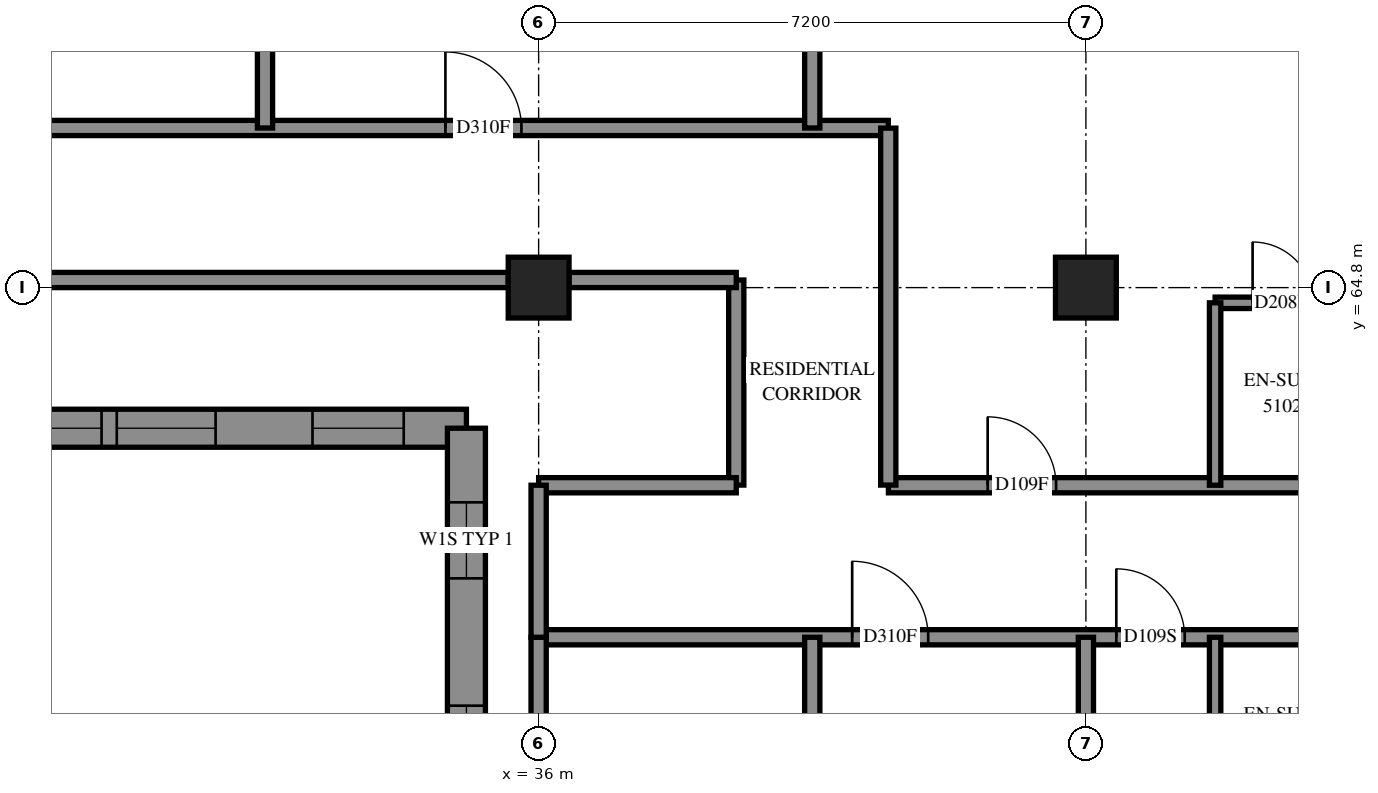
"""IFC4 building model, lengths in metres.
Left out: names, types, materials, properties, quantities, classifications, styles, units other than length and angle.
Written with IfcOpenShell. Run it as: python <this file> out.ifc"""

import sys

from ifc_helpers import new_model, si_unit, direction, frame, frame_2d, origin, origin_2d, place, context, subcontext, project, spatial, polyline, rectangle, outline, extrude, element, fill, save


model = new_model("IFC4")
c1 = context("Model", 3, precision=1e-05, world=origin(), true_north=direction((0.0, 1.0)))
c2 = subcontext(c1, "Body", "Model", "MODEL_VIEW")
j1 = project(units=[si_unit("LENGTHUNIT", "METRE"), si_unit("PLANEANGLEUNIT", "RADIAN")], contexts=[c1])
p1 = place(None, origin())
s1 = spatial("IfcSite", under=j1, at=p1, CompositionType="ELEMENT")
p2 = place(p1, origin())
s2 = spatial("IfcBuilding", under=s1, at=p2, CompositionType="ELEMENT")
p3 = place(p2, frame((0.0, 0.0, 189.6)))
s3 = spatial("IfcBuildingStorey", under=s2, at=p3, CompositionType="ELEMENT", Elevation=189.6)
for number, where, z_axis, x_axis in (
    (1, (36.0, 64.8, 0.0), (0.0, 0.0, 1.0), (1.0, 0.0, 0.0)),
    (2, (43.2, 64.8, 0.0), (0.0, 0.0, 1.0), (1.0, 0.0, 0.0)),
):
    element("IfcColumn", number, at=place(p3, frame(where, z_axis=z_axis, x_axis=x_axis)), inside=s3, PredefinedType="COLUMN", context=c2, shape_type="SweptSolid", body=[
        extrude(rectangle(XDim=0.8, YDim=0.8, at=origin_2d()), origin(), (0.0, 0.0, 1.0), 3.1),
    ])
p4 = place(p3, frame((19.75, 62.95, 0.0), z_axis=(0.0, 0.0, 1.0), x_axis=(1.0, 0.0, 0.0)))
e3 = element("IfcWall", 3, at=p4, inside=s3, PredefinedType="SOLIDWALL", context=c2, shape_type="SweptSolid", body=[
    extrude(outline(polyline([(-0.25, -0.25), (15.05, -0.25), (15.55, 0.25), (0.25, 0.25), (-0.25, -0.25)])), origin(), (0.0, 0.0, 1.0), 3.1),
])
p5 = place(p4, frame((2.25, 0.0, 0.45)))
e4 = element("IfcOpeningElement", 4, at=p5, cuts=e3, PredefinedType="OPENING", context=c2, shape_type="SweptSolid", body=[
    extrude(rectangle(XDim=1.3, YDim=2.5, at=frame_2d((0.65, 1.25))), frame((0.0, 0.26, 0.0), z_axis=(0.0, -1.0, 0.0), x_axis=(1.0, 0.0, 0.0)), (0.0, 0.0, 1.0), 0.52),
])
p6 = place(p4, frame((3.75, 0.0, 0.45)))
e5 = element("IfcOpeningElement", 5, at=p6, cuts=e3, PredefinedType="OPENING", context=c2, shape_type="SweptSolid", body=[
    extrude(rectangle(XDim=1.3, YDim=2.5, at=frame_2d((0.65, 1.25))), frame((0.0, 0.26, 0.0), z_axis=(0.0, -1.0, 0.0), x_axis=(1.0, 0.0, 0.0)), (0.0, 0.0, 1.0), 0.52),
])
p7 = place(p4, frame((5.85, 0.0, 0.45)))
e6 = element("IfcOpeningElement", 6, at=p7, cuts=e3, PredefinedType="OPENING", context=c2, shape_type="SweptSolid", body=[
    extrude(rectangle(XDim=1.3, YDim=2.5, at=frame_2d((0.65, 1.25))), frame((0.0, 0.26, 0.0), z_axis=(0.0, -1.0, 0.0), x_axis=(1.0, 0.0, 0.0)), (0.0, 0.0, 1.0), 0.52),
])
p8 = place(p4, frame((7.35, 0.0, 0.45)))
e7 = element("IfcOpeningElement", 7, at=p8, cuts=e3, PredefinedType="OPENING", context=c2, shape_type="SweptSolid", body=[
    extrude(rectangle(XDim=1.3, YDim=2.5, at=frame_2d((0.65, 1.25))), frame((0.0, 0.26, 0.0), z_axis=(0.0, -1.0, 0.0), x_axis=(1.0, 0.0, 0.0)), (0.0, 0.0, 1.0), 0.52),
])
p9 = place(p4, frame((9.2, 0.0, 0.45)))
e8 = element("IfcOpeningElement", 8, at=p9, cuts=e3, PredefinedType="OPENING", context=c2, shape_type="SweptSolid", body=[
    extrude(rectangle(XDim=1.3, YDim=2.5, at=frame_2d((0.65, 1.25))), frame((0.0, 0.26, 0.0), z_axis=(0.0, -1.0, 0.0), x_axis=(1.0, 0.0, 0.0)), (0.0, 0.0, 1.0), 0.52),
])
p10 = place(p4, frame((10.7, 0.0, 0.45)))
e9 = element("IfcOpeningElement", 9, at=p10, cuts=e3, PredefinedType="OPENING", context=c2, shape_type="SweptSolid", body=[
    extrude(rectangle(XDim=1.3, YDim=2.5, at=frame_2d((0.65, 1.25))), frame((0.0, 0.26, 0.0), z_axis=(0.0, -1.0, 0.0), x_axis=(1.0, 0.0, 0.0)), (0.0, 0.0, 1.0), 0.52),
])
p11 = place(p4, frame((0.55, 0.0, 0.45)))
e10 = element("IfcOpeningElement", 10, at=p11, cuts=e3, PredefinedType="OPENING", context=c2, shape_type="SweptSolid", body=[
    extrude(rectangle(XDim=1.2, YDim=2.5, at=frame_2d((0.6, 1.25))), frame((0.0, 0.26, 0.0), z_axis=(0.0, -1.0, 0.0), x_axis=(1.0, 0.0, 0.0)), (0.0, 0.0, 1.0), 0.52),
])
p12 = place(p4, frame((13.275, 0.0, 0.45)))
e11 = element("IfcOpeningElement", 11, at=p12, cuts=e3, PredefinedType="OPENING", context=c2, shape_type="SweptSolid", body=[
    extrude(rectangle(XDim=1.2, YDim=2.5, at=frame_2d((0.6, 1.25))), frame((0.0, 0.26, 0.0), z_axis=(0.0, -1.0, 0.0), x_axis=(1.0, 0.0, 0.0)), (0.0, 0.0, 1.0), 0.52),
])
p13 = place(p3, frame((35.05, 62.95, 0.0), z_axis=(0.0, 0.0, 1.0), x_axis=(0.0, -1.0, 0.0)))
e12 = element("IfcWall", 12, at=p13, inside=s3, PredefinedType="SOLIDWALL", context=c2, shape_type="SweptSolid", body=[
    extrude(outline(polyline([(0.25, -0.25), (6.55, -0.25), (6.05, 0.25), (-0.25, 0.25), (0.25, -0.25)])), origin(), (0.0, 0.0, 1.0), 3.1),
])
p14 = place(p13, frame((3.65, 0.0, 0.45)))
e13 = element("IfcOpeningElement", 13, at=p14, cuts=e12, PredefinedType="OPENING", context=c2, shape_type="SweptSolid", body=[
    extrude(rectangle(XDim=1.3, YDim=2.5, at=frame_2d((0.65, 1.25))), frame((0.0, 0.26, 0.0), z_axis=(0.0, -1.0, 0.0), x_axis=(1.0, 0.0, 0.0)), (0.0, 0.0, 1.0), 0.52),
])
p15 = place(p13, frame((0.975, 0.0, 0.45)))
e14 = element("IfcOpeningElement", 14, at=p15, cuts=e12, PredefinedType="OPENING", context=c2, shape_type="SweptSolid", body=[
    extrude(rectangle(XDim=1.0, YDim=2.5, at=frame_2d((0.5, 1.25))), frame((0.0, 0.26, 0.0), z_axis=(0.0, -1.0, 0.0), x_axis=(1.0, 0.0, 0.0)), (0.0, 0.0, 1.0), 0.52),
])
p16 = place(p3, frame((21.602, 66.9, 0.0), z_axis=(0.0, 0.0, 1.0), x_axis=(1.0, 0.0, 0.0)))
e15 = element("IfcWall", 15, at=p16, inside=s3, PredefinedType="PARTITIONING", context=c2, shape_type="SweptSolid", body=[
    extrude(rectangle(XDim=18.998, YDim=0.2, at=frame_2d((9.499, 0.0))), origin(), (0.0, 0.0, 1.0), 3.1),
])
p17 = place(p16, frame((5.972, 0.0, 0.0)))
e16 = element("IfcOpeningElement", 16, at=p17, cuts=e15, PredefinedType="OPENING", context=c2, shape_type="SweptSolid", body=[
    extrude(rectangle(XDim=1.0, YDim=2.1, at=frame_2d((0.5, 1.05))), frame((0.0, 0.11, 0.0), z_axis=(0.0, -1.0, 0.0), x_axis=(1.0, 0.0, 0.0)), (0.0, 0.0, 1.0), 0.22),
])
p18 = place(p16, frame((13.172, 0.0, 0.0)))
e17 = element("IfcOpeningElement", 17, at=p18, cuts=e15, PredefinedType="OPENING", context=c2, shape_type="SweptSolid", body=[
    extrude(rectangle(XDim=1.0, YDim=2.1, at=frame_2d((0.5, 1.05))), frame((0.0, 0.11, 0.0), z_axis=(0.0, -1.0, 0.0), x_axis=(1.0, 0.0, 0.0)), (0.0, 0.0, 1.0), 0.22),
])
p19 = place(p3, frame((36.0, 60.2, 0.0), z_axis=(0.0, 0.0, 1.0), x_axis=(1.0, 0.0, 0.0)))
e18 = element("IfcWall", 18, at=p19, inside=s3, PredefinedType="PARTITIONING", context=c2, shape_type="SweptSolid", body=[
    extrude(rectangle(XDim=17.0, YDim=0.2, at=frame_2d((8.5, 0.0))), origin(), (0.0, 0.0, 1.0), 3.1),
])
p20 = place(p19, frame((4.125, 0.0, 0.0)))
e19 = element("IfcOpeningElement", 19, at=p20, cuts=e18, PredefinedType="OPENING", context=c2, shape_type="SweptSolid", body=[
    extrude(rectangle(XDim=1.0, YDim=2.1, at=frame_2d((0.5, 1.05))), frame((0.0, 0.11, 0.0), z_axis=(0.0, -1.0, 0.0), x_axis=(1.0, 0.0, 0.0)), (0.0, 0.0, 1.0), 0.22),
])
p21 = place(p19, frame((7.6, 0.0, 0.0)))
e20 = element("IfcOpeningElement", 20, at=p21, cuts=e18, PredefinedType="OPENING", context=c2, shape_type="SweptSolid", body=[
    extrude(rectangle(XDim=0.9, YDim=2.1, at=frame_2d((0.45, 1.05))), frame((0.0, 0.11, 0.0), z_axis=(0.0, -1.0, 0.0), x_axis=(1.0, 0.0, 0.0)), (0.0, 0.0, 1.0), 0.22),
])
p22 = place(p19, frame((11.48, 0.0, 0.0)))
e21 = element("IfcOpeningElement", 21, at=p22, cuts=e18, PredefinedType="OPENING", context=c2, shape_type="SweptSolid", body=[
    extrude(rectangle(XDim=1.0, YDim=2.1, at=frame_2d((0.5, 1.05))), frame((0.0, 0.11, 0.0), z_axis=(0.0, -1.0, 0.0), x_axis=(1.0, 0.0, 0.0)), (0.0, 0.0, 1.0), 0.22),
])
p23 = place(p19, frame((15.805, 0.0, 0.0)))
e22 = element("IfcOpeningElement", 22, at=p23, cuts=e18, PredefinedType="OPENING", context=c2, shape_type="SweptSolid", body=[
    extrude(rectangle(XDim=1.0, YDim=2.1, at=frame_2d((0.5, 1.05))), frame((0.0, 0.11, 0.0), z_axis=(0.0, -1.0, 0.0), x_axis=(1.0, 0.0, 0.0)), (0.0, 0.0, 1.0), 0.22),
])
p24 = place(p3, frame((40.602, 62.2, 0.0), z_axis=(0.0, 0.0, 1.0), x_axis=(1.0, 0.0, 0.0)))
e23 = element("IfcWall", 23, at=p24, inside=s3, PredefinedType="PARTITIONING", context=c2, shape_type="SweptSolid", body=[
    extrude(rectangle(XDim=14.998, YDim=0.2, at=frame_2d((7.499, 0.0))), origin(), (0.0, 0.0, 1.0), 3.1),
])
p25 = place(p24, frame((1.306, 0.0, 0.0)))
e24 = element("IfcOpeningElement", 24, at=p25, cuts=e23, PredefinedType="OPENING", context=c2, shape_type="SweptSolid", body=[
    extrude(rectangle(XDim=0.9, YDim=2.1, at=frame_2d((0.45, 1.05))), frame((0.0, 0.11, 0.0), z_axis=(0.0, -1.0, 0.0), x_axis=(1.0, 0.0, 0.0)), (0.0, 0.0, 1.0), 0.22),
])
p26 = place(p24, frame((8.548, 0.0, 0.0)))
e25 = element("IfcOpeningElement", 25, at=p26, cuts=e23, PredefinedType="OPENING", context=c2, shape_type="SweptSolid", body=[
    extrude(rectangle(XDim=0.9, YDim=2.1, at=frame_2d((0.45, 1.05))), frame((0.0, 0.11, 0.0), z_axis=(0.0, -1.0, 0.0), x_axis=(1.0, 0.0, 0.0)), (0.0, 0.0, 1.0), 0.22),
])
p27 = place(p24, frame((10.198, 0.0, 0.0)))
e26 = element("IfcOpeningElement", 26, at=p27, cuts=e23, PredefinedType="OPENING", context=c2, shape_type="SweptSolid", body=[
    extrude(rectangle(XDim=0.9, YDim=2.1, at=frame_2d((0.45, 1.05))), frame((0.0, 0.11, 0.0), z_axis=(0.0, -1.0, 0.0), x_axis=(1.0, 0.0, 0.0)), (0.0, 0.0, 1.0), 0.22),
])
p28 = place(p24, frame((13.746, 0.0, 0.0)))
e27 = element("IfcOpeningElement", 27, at=p28, cuts=e23, PredefinedType="OPENING", context=c2, shape_type="SweptSolid", body=[
    extrude(rectangle(XDim=1.0, YDim=2.1, at=frame_2d((0.5, 1.05))), frame((0.0, 0.11, 0.0), z_axis=(0.0, -1.0, 0.0), x_axis=(1.0, 0.0, 0.0)), (0.0, 0.0, 1.0), 0.22),
])
p29 = place(p3, frame((29.2, 64.9, 0.0), z_axis=(0.0, 0.0, 1.0), x_axis=(1.0, 0.0, 0.0)))
e28 = element("IfcWall", 28, at=p29, inside=s3, PredefinedType="PARTITIONING", context=c2, shape_type="SweptSolid", body=[
    extrude(rectangle(XDim=6.4, YDim=0.2, at=frame_2d((3.2, 0.0))), origin(), (0.0, 0.0, 1.0), 2.6),
])
p30 = place(p3, frame((32.4, 66.9, 0.0), z_axis=(0.0, 0.0, 1.0), x_axis=(0.0, 1.0, 0.0)))
e29 = element("IfcWall", 29, at=p30, inside=s3, PredefinedType="PARTITIONING", context=c2, shape_type="SweptSolid", body=[
    extrude(rectangle(XDim=5.921, YDim=0.2, at=frame_2d((2.96, 0.0))), origin(), (0.0, 0.0, 1.0), 3.1),
])
p31 = place(p3, frame((39.6, 66.9, 0.0), z_axis=(0.0, 0.0, 1.0), x_axis=(0.0, 1.0, 0.0)))
e30 = element("IfcWall", 30, at=p31, inside=s3, PredefinedType="PARTITIONING", context=c2, shape_type="SweptSolid", body=[
    extrude(rectangle(XDim=5.891, YDim=0.2, at=frame_2d((2.946, 0.0))), origin(), (0.0, 0.0, 1.0), 3.1),
])
p32 = place(p3, frame((40.6, 62.202, 0.0), z_axis=(0.0, 0.0, 1.0), x_axis=(0.0, 1.0, 0.0)))
e31 = element("IfcWall", 31, at=p32, inside=s3, PredefinedType="PARTITIONING", context=c2, shape_type="SweptSolid", body=[
    extrude(rectangle(XDim=4.696, YDim=0.2, at=frame_2d((2.348, 0.0))), origin(), (0.0, 0.0, 1.0), 3.1),
])
p33 = place(p3, frame((44.9, 64.6, 0.0), z_axis=(0.0, 0.0, 1.0), x_axis=(1.0, 0.0, 0.0)))
e32 = element("IfcWall", 32, at=p33, inside=s3, PredefinedType="PARTITIONING", context=c2, shape_type="SweptSolid", body=[
    extrude(rectangle(XDim=3.8, YDim=0.15, at=frame_2d((1.9, 0.0))), origin(), (0.0, 0.0, 1.0), 3.1),
])
p34 = place(p33, frame((0.493, 0.0, 0.0)))
e33 = element("IfcOpeningElement", 33, at=p34, cuts=e32, PredefinedType="OPENING", context=c2, shape_type="SweptSolid", body=[
    extrude(rectangle(XDim=0.8, YDim=2.1, at=frame_2d((0.4, 1.05))), frame((0.0, 0.085, 0.0), z_axis=(0.0, -1.0, 0.0), x_axis=(1.0, 0.0, 0.0)), (0.0, 0.0, 1.0), 0.17),
])
p35 = place(p33, frame((2.507, 0.0, 0.0)))
e34 = element("IfcOpeningElement", 34, at=p35, cuts=e32, PredefinedType="OPENING", context=c2, shape_type="SweptSolid", body=[
    extrude(rectangle(XDim=0.8, YDim=2.1, at=frame_2d((0.4, 1.05))), frame((0.0, 0.085, 0.0), z_axis=(0.0, -1.0, 0.0), x_axis=(1.0, 0.0, 0.0)), (0.0, 0.0, 1.0), 0.17),
])
p36 = place(p3, frame((39.6, 56.9, 0.0), z_axis=(0.0, 0.0, 1.0), x_axis=(0.0, 1.0, 0.0)))
e35 = element("IfcWall", 35, at=p36, inside=s3, PredefinedType="PARTITIONING", context=c2, shape_type="SweptSolid", body=[
    extrude(rectangle(XDim=3.3, YDim=0.2, at=frame_2d((1.65, 0.0))), origin(), (0.0, 0.0, 1.0), 3.1),
])
p37 = place(p3, frame((38.6, 62.202, 0.0), z_axis=(0.0, 0.0, 1.0), x_axis=(0.0, 1.0, 0.0)))
e36 = element("IfcWall", 36, at=p37, inside=s3, PredefinedType="PARTITIONING", context=c2, shape_type="SweptSolid", body=[
    extrude(rectangle(XDim=2.698, YDim=0.2, at=frame_2d((1.349, 0.0))), origin(), (0.0, 0.0, 1.0), 3.1),
])
p38 = place(p3, frame((36.0, 62.2, 0.0), z_axis=(0.0, 0.0, 1.0), x_axis=(1.0, 0.0, 0.0)))
e37 = element("IfcWall", 37, at=p38, inside=s3, PredefinedType="PARTITIONING", context=c2, shape_type="SweptSolid", body=[
    extrude(rectangle(XDim=2.6, YDim=0.2, at=frame_2d((1.3, 0.0))), origin(), (0.0, 0.0, 1.0), 3.1),
])
for number, where, z_axis, x_axis in (
    (38, (44.9, 57.8, 0.0), (0.0, 0.0, 1.0), (0.0, 1.0, 0.0)),
    (39, (44.9, 62.2, 0.0), (0.0, 0.0, 1.0), (0.0, 1.0, 0.0)),
):
    element("IfcWall", number, at=place(p3, frame(where, z_axis=z_axis, x_axis=x_axis)), inside=s3, PredefinedType="PARTITIONING", context=c2, shape_type="SweptSolid", body=[
        extrude(rectangle(XDim=2.4, YDim=0.15, at=frame_2d((1.2, 0.0))), origin(), (0.0, 0.0, 1.0), 3.1),
    ])
p39 = place(p3, frame((36.4, 64.9, 0.0), z_axis=(0.0, 0.0, 1.0), x_axis=(1.0, 0.0, 0.0)))
e40 = element("IfcWall", 40, at=p39, inside=s3, PredefinedType="PARTITIONING", context=c2, shape_type="SweptSolid", body=[
    extrude(rectangle(XDim=2.2, YDim=0.2, at=frame_2d((1.1, 0.0))), origin(), (0.0, 0.0, 1.0), 3.1),
])
p40 = place(p3, frame((36.0, 58.0, 0.0), z_axis=(0.0, 0.0, 1.0), x_axis=(0.0, 1.0, 0.0)))
e41 = element("IfcWall", 41, at=p40, inside=s3, PredefinedType="PARTITIONING", context=c2, shape_type="SweptSolid", body=[
    extrude(rectangle(XDim=2.2, YDim=0.2, at=frame_2d((1.1, 0.0))), origin(), (0.0, 0.0, 1.0), 2.6),
])
p41 = place(p3, frame((43.2, 58.0, 0.0), z_axis=(0.0, 0.0, 1.0), x_axis=(0.0, 1.0, 0.0)))
e42 = element("IfcWall", 42, at=p41, inside=s3, PredefinedType="PARTITIONING", context=c2, shape_type="SweptSolid", body=[
    extrude(rectangle(XDim=2.2, YDim=0.2, at=frame_2d((1.1, 0.0))), origin(), (0.0, 0.0, 1.0), 3.1),
])
p42 = place(p3, frame((36.0, 60.2, 0.0), z_axis=(0.0, 0.0, 1.0), x_axis=(0.0, 1.0, 0.0)))
e43 = element("IfcWall", 43, at=p42, inside=s3, PredefinedType="PARTITIONING", context=c2, shape_type="SweptSolid", body=[
    extrude(rectangle(XDim=2.0, YDim=0.2, at=frame_2d((1.0, 0.0))), origin(), (0.0, 0.0, 1.0), 2.6),
])
p43 = place(p9, origin())
e44 = element("IfcWindow", 44, at=p43, inside=s3, PartitioningType="SINGLE_PANEL", PredefinedType="WINDOW", context=c2, shape_type="SweptSolid", body=[
    extrude(rectangle(XDim=1.3, YDim=2.5, at=frame_2d((0.65, 1.25))), frame((0.0, 0.18, 0.0), z_axis=(0.0, -1.0, 0.0), x_axis=(1.0, 0.0, 0.0)), (0.0, 0.0, 1.0), 0.06),
])
fill(e8, e44)
p44 = place(p10, origin())
e45 = element("IfcWindow", 45, at=p44, inside=s3, PartitioningType="SINGLE_PANEL", PredefinedType="WINDOW", context=c2, shape_type="SweptSolid", body=[
    extrude(rectangle(XDim=1.3, YDim=2.5, at=frame_2d((0.65, 1.25))), frame((0.0, 0.18, 0.0), z_axis=(0.0, -1.0, 0.0), x_axis=(1.0, 0.0, 0.0)), (0.0, 0.0, 1.0), 0.06),
])
fill(e9, e45)
p45 = place(p12, origin())
e46 = element("IfcWindow", 46, at=p45, inside=s3, PartitioningType="SINGLE_PANEL", PredefinedType="WINDOW", context=c2, shape_type="SweptSolid", body=[
    extrude(rectangle(XDim=1.2, YDim=2.5, at=frame_2d((0.6, 1.25))), frame((0.0, 0.18, 0.0), z_axis=(0.0, -1.0, 0.0), x_axis=(1.0, 0.0, 0.0)), (0.0, 0.0, 1.0), 0.06),
])
fill(e11, e46)
p46 = place(p14, origin())
e47 = element("IfcWindow", 47, at=p46, inside=s3, PartitioningType="SINGLE_PANEL", PredefinedType="WINDOW", context=c2, shape_type="SweptSolid", body=[
    extrude(rectangle(XDim=1.3, YDim=2.5, at=frame_2d((0.65, 1.25))), frame((0.0, 0.18, 0.0), z_axis=(0.0, -1.0, 0.0), x_axis=(1.0, 0.0, 0.0)), (0.0, 0.0, 1.0), 0.06),
])
fill(e13, e47)
p47 = place(p18, origin())
e48 = element("IfcDoor", 48, at=p47, inside=s3, OperationType="SINGLE_SWING_LEFT", PredefinedType="DOOR", context=c2, shape_type="SweptSolid", body=[
    extrude(rectangle(XDim=1.0, YDim=2.1, at=frame_2d((0.5, 1.05))), frame((0.0, 0.025, 0.0), z_axis=(0.0, -1.0, 0.0), x_axis=(1.0, 0.0, 0.0)), (0.0, 0.0, 1.0), 0.05),
])
fill(e17, e48)
p48 = place(p20, origin())
e49 = element("IfcDoor", 49, at=p48, inside=s3, OperationType="SINGLE_SWING_RIGHT", PredefinedType="DOOR", context=c2, shape_type="SweptSolid", body=[
    extrude(rectangle(XDim=1.0, YDim=2.1, at=frame_2d((0.5, 1.05))), frame((0.0, 0.025, 0.0), z_axis=(0.0, -1.0, 0.0), x_axis=(1.0, 0.0, 0.0)), (0.0, 0.0, 1.0), 0.05),
])
fill(e19, e49)
p49 = place(p21, origin())
e50 = element("IfcDoor", 50, at=p49, inside=s3, OperationType="SINGLE_SWING_LEFT", PredefinedType="DOOR", context=c2, shape_type="SweptSolid", body=[
    extrude(rectangle(XDim=0.9, YDim=2.1, at=frame_2d((0.45, 1.05))), frame((0.0, 0.025, 0.0), z_axis=(0.0, -1.0, 0.0), x_axis=(1.0, 0.0, 0.0)), (0.0, 0.0, 1.0), 0.05),
])
fill(e20, e50)
p50 = place(p25, origin())
e51 = element("IfcDoor", 51, at=p50, inside=s3, OperationType="SINGLE_SWING_LEFT", PredefinedType="DOOR", context=c2, shape_type="SweptSolid", body=[
    extrude(rectangle(XDim=0.9, YDim=2.1, at=frame_2d((0.45, 1.05))), frame((0.0, 0.025, 0.0), z_axis=(0.0, -1.0, 0.0), x_axis=(1.0, 0.0, 0.0)), (0.0, 0.0, 1.0), 0.05),
])
fill(e24, e51)
p51 = place(p34, origin())
e52 = element("IfcDoor", 52, at=p51, inside=s3, OperationType="SINGLE_SWING_RIGHT", PredefinedType="DOOR", context=c2, shape_type="SweptSolid", body=[
    extrude(rectangle(XDim=0.8, YDim=2.1, at=frame_2d((0.4, 1.05))), frame((0.0, 0.025, 0.0), z_axis=(0.0, -1.0, 0.0), x_axis=(1.0, 0.0, 0.0)), (0.0, 0.0, 1.0), 0.05),
])
fill(e33, e52)
p52 = place(p15, origin())
e53 = element("IfcWindow", 53, at=p52, inside=s3, PartitioningType="SINGLE_PANEL", PredefinedType="WINDOW", context=c2, shape_type="SweptSolid", body=[
    extrude(rectangle(XDim=1.0, YDim=2.5, at=frame_2d((0.5, 1.25))), frame((0.0, 0.18, 0.0), z_axis=(0.0, -1.0, 0.0), x_axis=(1.0, 0.0, 0.0)), (0.0, 0.0, 1.0), 0.06),
])
fill(e14, e53)
save(model, sys.argv[1])
